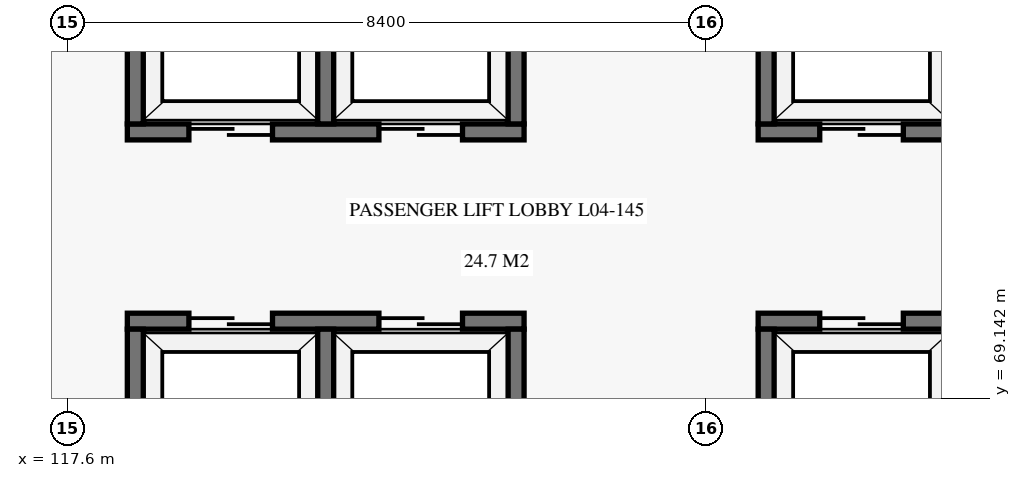
"""IFC4 building model, lengths in metres.
Left out: names, types, materials, properties, quantities, classifications, styles, units other than length and angle.
Written with IfcOpenShell. Run it as: python <this file> out.ifc"""

import sys

from ifc_helpers import new_model, si_unit, direction, frame, frame_2d, origin, place, context, subcontext, project, spatial, rectangle, extrude, element, fill, save


model = new_model("IFC4")
c1 = context("Model", 3, precision=1e-05, world=origin(), true_north=direction((0.0, 1.0)))
c2 = subcontext(c1, "Body", "Model", "MODEL_VIEW")
j1 = project(units=[si_unit("LENGTHUNIT", "METRE"), si_unit("PLANEANGLEUNIT", "RADIAN")], contexts=[c1])
p1 = place(None, origin())
s1 = spatial("IfcSite", under=j1, at=p1, CompositionType="ELEMENT")
p2 = place(p1, origin())
s2 = spatial("IfcBuilding", under=s1, at=p2, CompositionType="ELEMENT")
p3 = place(p2, frame((0.0, 0.0, 16.8)))
s3 = spatial("IfcBuildingStorey", under=s2, at=p3, CompositionType="ELEMENT", Elevation=16.8)
p4 = place(p3, frame((126.69, 70.155, 0.0), z_axis=(0.0, 0.0, 1.0), x_axis=(1.0, 0.0, 0.0)))
e1 = element("IfcWall", 1, at=p4, inside=s3, PredefinedType="SHEAR", context=c2, shape_type="SweptSolid", body=[
    extrude(rectangle(XDim=5.22, YDim=0.21, at=frame_2d((2.61, 0.0))), origin(), (0.0, 0.0, 1.0), 5.1),
])
p5 = place(p4, frame((0.81, 0.0, 0.0)))
e2 = element("IfcOpeningElement", 2, at=p5, cuts=e1, PredefinedType="OPENING", context=c2, shape_type="SweptSolid", body=[
    extrude(rectangle(XDim=1.1, YDim=2.15, at=frame_2d((0.55, 1.075))), frame((0.0, 0.115, 0.0), z_axis=(0.0, -1.0, 0.0), x_axis=(1.0, 0.0, 0.0)), (0.0, 0.0, 1.0), 0.23),
])
p6 = place(p4, frame((3.31, 0.0, 0.0)))
e3 = element("IfcOpeningElement", 3, at=p6, cuts=e1, PredefinedType="OPENING", context=c2, shape_type="SweptSolid", body=[
    extrude(rectangle(XDim=1.1, YDim=2.15, at=frame_2d((0.55, 1.075))), frame((0.0, 0.115, 0.0), z_axis=(0.0, -1.0, 0.0), x_axis=(1.0, 0.0, 0.0)), (0.0, 0.0, 1.0), 0.23),
])
p7 = place(p3, frame((126.795, 67.85, 0.0), z_axis=(0.0, 0.0, 1.0), x_axis=(0.0, 1.0, 0.0)))
e4 = element("IfcWall", 4, at=p7, inside=s3, PredefinedType="SHEAR", context=c2, shape_type="SweptSolid", body=[
    extrude(rectangle(XDim=2.2, YDim=0.21, at=frame_2d((1.1, 0.0))), origin(), (0.0, 0.0, 1.0), 5.1),
])
p8 = place(p3, frame((126.69, 72.645, 0.0), z_axis=(0.0, 0.0, 1.0), x_axis=(1.0, 0.0, 0.0)))
e5 = element("IfcWall", 5, at=p8, inside=s3, PredefinedType="SHEAR", context=c2, shape_type="SweptSolid", body=[
    extrude(rectangle(XDim=5.22, YDim=0.21, at=frame_2d((2.61, 0.0))), origin(), (0.0, 0.0, 1.0), 5.1),
])
p9 = place(p8, frame((0.81, 0.0, 0.0)))
e6 = element("IfcOpeningElement", 6, at=p9, cuts=e5, PredefinedType="OPENING", context=c2, shape_type="SweptSolid", body=[
    extrude(rectangle(XDim=1.1, YDim=2.15, at=frame_2d((0.55, 1.075))), frame((0.0, 0.115, 0.0), z_axis=(0.0, -1.0, 0.0), x_axis=(1.0, 0.0, 0.0)), (0.0, 0.0, 1.0), 0.23),
])
p10 = place(p8, frame((3.31, 0.0, 0.0)))
e7 = element("IfcOpeningElement", 7, at=p10, cuts=e5, PredefinedType="OPENING", context=c2, shape_type="SweptSolid", body=[
    extrude(rectangle(XDim=1.1, YDim=2.15, at=frame_2d((0.55, 1.075))), frame((0.0, 0.115, 0.0), z_axis=(0.0, -1.0, 0.0), x_axis=(1.0, 0.0, 0.0)), (0.0, 0.0, 1.0), 0.23),
])
p11 = place(p3, frame((126.795, 72.75, 0.0), z_axis=(0.0, 0.0, 1.0), x_axis=(0.0, 1.0, 0.0)))
e8 = element("IfcWall", 8, at=p11, inside=s3, PredefinedType="SHEAR", context=c2, shape_type="SweptSolid", body=[
    extrude(rectangle(XDim=2.2, YDim=0.21, at=frame_2d((1.1, 0.0))), origin(), (0.0, 0.0, 1.0), 5.1),
])
p12 = place(p3, frame((118.39, 70.155, 0.0), z_axis=(0.0, 0.0, 1.0), x_axis=(1.0, 0.0, 0.0)))
e9 = element("IfcWall", 9, at=p12, inside=s3, PredefinedType="SHEAR", context=c2, shape_type="SweptSolid", body=[
    extrude(rectangle(XDim=5.22, YDim=0.21, at=frame_2d((2.61, 0.0))), origin(), (0.0, 0.0, 1.0), 5.1),
])
p13 = place(p12, frame((0.81, 0.0, 0.0)))
e10 = element("IfcOpeningElement", 10, at=p13, cuts=e9, PredefinedType="OPENING", context=c2, shape_type="SweptSolid", body=[
    extrude(rectangle(XDim=1.1, YDim=2.15, at=frame_2d((0.55, 1.075))), frame((0.0, 0.115, 0.0), z_axis=(0.0, -1.0, 0.0), x_axis=(1.0, 0.0, 0.0)), (0.0, 0.0, 1.0), 0.23),
])
p14 = place(p12, frame((3.31, 0.0, 0.0)))
e11 = element("IfcOpeningElement", 11, at=p14, cuts=e9, PredefinedType="OPENING", context=c2, shape_type="SweptSolid", body=[
    extrude(rectangle(XDim=1.1, YDim=2.15, at=frame_2d((0.55, 1.075))), frame((0.0, 0.115, 0.0), z_axis=(0.0, -1.0, 0.0), x_axis=(1.0, 0.0, 0.0)), (0.0, 0.0, 1.0), 0.23),
])
for number, where, z_axis, x_axis in (
    (12, (118.495, 67.85, 0.0), (0.0, 0.0, 1.0), (0.0, 1.0, 0.0)),
    (13, (123.505, 67.85, 0.0), (0.0, 0.0, 1.0), (0.0, 1.0, 0.0)),
    (14, (121.0, 67.85, 0.0), (0.0, 0.0, 1.0), (0.0, 1.0, 0.0)),
):
    element("IfcWall", number, at=place(p3, frame(where, z_axis=z_axis, x_axis=x_axis)), inside=s3, PredefinedType="SHEAR", context=c2, shape_type="SweptSolid", body=[
        extrude(rectangle(XDim=2.2, YDim=0.21, at=frame_2d((1.1, 0.0))), origin(), (0.0, 0.0, 1.0), 5.1),
    ])
p15 = place(p3, frame((118.39, 72.645, 0.0), z_axis=(0.0, 0.0, 1.0), x_axis=(1.0, 0.0, 0.0)))
e15 = element("IfcWall", 15, at=p15, inside=s3, PredefinedType="SHEAR", context=c2, shape_type="SweptSolid", body=[
    extrude(rectangle(XDim=5.22, YDim=0.21, at=frame_2d((2.61, 0.0))), origin(), (0.0, 0.0, 1.0), 5.1),
])
p16 = place(p15, frame((0.81, 0.0, 0.0)))
e16 = element("IfcOpeningElement", 16, at=p16, cuts=e15, PredefinedType="OPENING", context=c2, shape_type="SweptSolid", body=[
    extrude(rectangle(XDim=1.1, YDim=2.15, at=frame_2d((0.55, 1.075))), frame((0.0, 0.115, 0.0), z_axis=(0.0, -1.0, 0.0), x_axis=(1.0, 0.0, 0.0)), (0.0, 0.0, 1.0), 0.23),
])
p17 = place(p15, frame((3.31, 0.0, 0.0)))
e17 = element("IfcOpeningElement", 17, at=p17, cuts=e15, PredefinedType="OPENING", context=c2, shape_type="SweptSolid", body=[
    extrude(rectangle(XDim=1.1, YDim=2.15, at=frame_2d((0.55, 1.075))), frame((0.0, 0.115, 0.0), z_axis=(0.0, -1.0, 0.0), x_axis=(1.0, 0.0, 0.0)), (0.0, 0.0, 1.0), 0.23),
])
for number, where, z_axis, x_axis in (
    (18, (118.495, 72.75, 0.0), (0.0, 0.0, 1.0), (0.0, 1.0, 0.0)),
    (19, (123.505, 72.75, 0.0), (0.0, 0.0, 1.0), (0.0, 1.0, 0.0)),
    (20, (121.0, 72.75, 0.0), (0.0, 0.0, 1.0), (0.0, 1.0, 0.0)),
):
    element("IfcWall", number, at=place(p3, frame(where, z_axis=z_axis, x_axis=x_axis)), inside=s3, PredefinedType="SHEAR", context=c2, shape_type="SweptSolid", body=[
        extrude(rectangle(XDim=2.2, YDim=0.21, at=frame_2d((1.1, 0.0))), origin(), (0.0, 0.0, 1.0), 5.1),
    ])
p18 = place(p5, origin())
e21 = element("IfcDoor", 21, at=p18, inside=s3, OperationType="DOUBLE_DOOR_SLIDING", PredefinedType="DOOR", context=c2, shape_type="SweptSolid", body=[
    extrude(rectangle(XDim=1.1, YDim=2.15, at=frame_2d((0.55, 1.075))), frame((0.0, 0.025, 0.0), z_axis=(0.0, -1.0, 0.0), x_axis=(1.0, 0.0, 0.0)), (0.0, 0.0, 1.0), 0.05),
])
fill(e2, e21)
p19 = place(p9, origin())
e22 = element("IfcDoor", 22, at=p19, inside=s3, OperationType="DOUBLE_DOOR_SLIDING", PredefinedType="DOOR", context=c2, shape_type="SweptSolid", body=[
    extrude(rectangle(XDim=1.1, YDim=2.15, at=frame_2d((0.55, 1.075))), frame((0.0, 0.025, 0.0), z_axis=(0.0, -1.0, 0.0), x_axis=(1.0, 0.0, 0.0)), (0.0, 0.0, 1.0), 0.05),
])
fill(e6, e22)
p20 = place(p13, origin())
e23 = element("IfcDoor", 23, at=p20, inside=s3, OperationType="DOUBLE_DOOR_SLIDING", PredefinedType="DOOR", context=c2, shape_type="SweptSolid", body=[
    extrude(rectangle(XDim=1.1, YDim=2.15, at=frame_2d((0.55, 1.075))), frame((0.0, 0.025, 0.0), z_axis=(0.0, -1.0, 0.0), x_axis=(1.0, 0.0, 0.0)), (0.0, 0.0, 1.0), 0.05),
])
fill(e10, e23)
p21 = place(p14, origin())
e24 = element("IfcDoor", 24, at=p21, inside=s3, OperationType="DOUBLE_DOOR_SLIDING", PredefinedType="DOOR", context=c2, shape_type="SweptSolid", body=[
    extrude(rectangle(XDim=1.1, YDim=2.15, at=frame_2d((0.55, 1.075))), frame((0.0, 0.025, 0.0), z_axis=(0.0, -1.0, 0.0), x_axis=(1.0, 0.0, 0.0)), (0.0, 0.0, 1.0), 0.05),
])
fill(e11, e24)
p22 = place(p16, origin())
e25 = element("IfcDoor", 25, at=p22, inside=s3, OperationType="DOUBLE_DOOR_SLIDING", PredefinedType="DOOR", context=c2, shape_type="SweptSolid", body=[
    extrude(rectangle(XDim=1.1, YDim=2.15, at=frame_2d((0.55, 1.075))), frame((0.0, 0.025, 0.0), z_axis=(0.0, -1.0, 0.0), x_axis=(1.0, 0.0, 0.0)), (0.0, 0.0, 1.0), 0.05),
])
fill(e16, e25)
p23 = place(p17, origin())
e26 = element("IfcDoor", 26, at=p23, inside=s3, OperationType="DOUBLE_DOOR_SLIDING", PredefinedType="DOOR", context=c2, shape_type="SweptSolid", body=[
    extrude(rectangle(XDim=1.1, YDim=2.15, at=frame_2d((0.55, 1.075))), frame((0.0, 0.025, 0.0), z_axis=(0.0, -1.0, 0.0), x_axis=(1.0, 0.0, 0.0)), (0.0, 0.0, 1.0), 0.05),
])
fill(e17, e26)
save(model, sys.argv[1])
